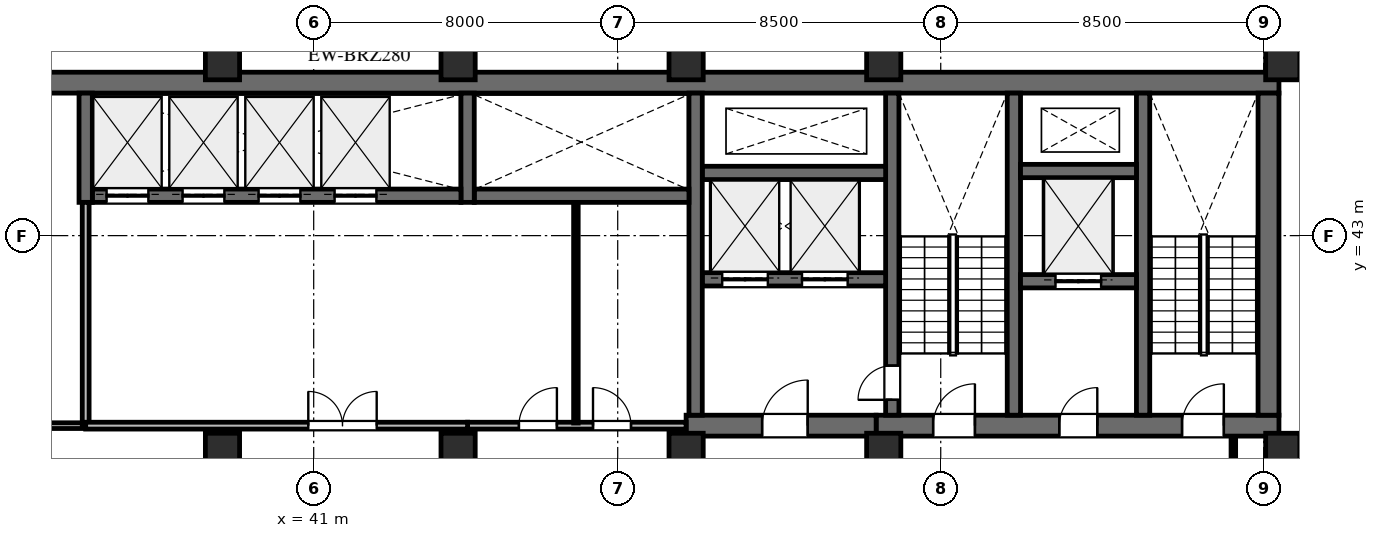
"""IFC4 building model, lengths in metres.
Left out: names, types, materials, properties, quantities, classifications, styles, units other than length and angle.
Written with IfcOpenShell. Run it as: python <this file> out.ifc"""

import sys

from ifc_helpers import new_model, si_unit, direction, frame, frame_2d, origin, origin_2d, place, context, subcontext, project, spatial, rectangle, extrude, element, fill, save


model = new_model("IFC4")
c1 = context("Model", 3, precision=1e-05, world=origin(), true_north=direction((0.0, 1.0)))
c2 = subcontext(c1, "Body", "Model", "MODEL_VIEW")
j1 = project(units=[si_unit("LENGTHUNIT", "METRE"), si_unit("PLANEANGLEUNIT", "RADIAN")], contexts=[c1])
p1 = place(None, origin())
s1 = spatial("IfcSite", under=j1, at=p1, CompositionType="ELEMENT")
p2 = place(p1, origin())
s2 = spatial("IfcBuilding", under=s1, at=p2, CompositionType="ELEMENT")
p3 = place(p2, frame((0.0, 0.0, 180.5)))
s3 = spatial("IfcBuildingStorey", under=s2, at=p3, CompositionType="ELEMENT", Elevation=180.5)
p4 = place(p3, frame((22.9, 47.025, 0.0), z_axis=(0.0, 0.0, 1.0), x_axis=(1.0, 0.0, 0.0)))
e1 = element("IfcWall", 1, at=p4, inside=s3, PredefinedType="SHEAR", context=c2, shape_type="SweptSolid", body=[
    extrude(rectangle(XDim=43.5, YDim=0.55, at=frame_2d((21.75, 0.0))), origin(), (0.0, 0.0, 1.0), 4.0),
])
p5 = place(p3, frame((55.8, 38.0, 0.0), z_axis=(0.0, 0.0, 1.0), x_axis=(1.0, 0.0, 0.0)))
e2 = element("IfcWall", 2, at=p5, inside=s3, PredefinedType="SHEAR", context=c2, shape_type="SweptSolid", body=[
    extrude(rectangle(XDim=10.6, YDim=0.55, at=frame_2d((5.3, 0.0))), origin(), (0.0, 0.0, 1.0), 4.0),
])
p6 = place(p5, frame((1.5, 0.0, 0.0)))
e3 = element("IfcOpeningElement", 3, at=p6, cuts=e2, PredefinedType="OPENING", context=c2, shape_type="SweptSolid", body=[
    extrude(rectangle(XDim=1.1, YDim=2.2, at=frame_2d((0.55, 1.1))), frame((0.0, 0.285, 0.0), z_axis=(0.0, -1.0, 0.0), x_axis=(1.0, 0.0, 0.0)), (0.0, 0.0, 1.0), 0.57),
])
p7 = place(p5, frame((4.82, 0.0, 0.0)))
e4 = element("IfcOpeningElement", 4, at=p7, cuts=e2, PredefinedType="OPENING", context=c2, shape_type="SweptSolid", body=[
    extrude(rectangle(XDim=1.0, YDim=2.15, at=frame_2d((0.5, 1.075))), frame((0.0, 0.285, 0.0), z_axis=(0.0, -1.0, 0.0), x_axis=(1.0, 0.0, 0.0)), (0.0, 0.0, 1.0), 0.57),
])
p8 = place(p5, frame((8.05, 0.0, 0.0)))
e5 = element("IfcOpeningElement", 5, at=p8, cuts=e2, PredefinedType="OPENING", context=c2, shape_type="SweptSolid", body=[
    extrude(rectangle(XDim=1.1, YDim=2.2, at=frame_2d((0.55, 1.1))), frame((0.0, 0.285, 0.0), z_axis=(0.0, -1.0, 0.0), x_axis=(1.0, 0.0, 0.0)), (0.0, 0.0, 1.0), 0.57),
])
p9 = place(p3, frame((66.125, 38.275, 0.0), z_axis=(0.0, 0.0, 1.0), x_axis=(0.0, 1.0, 0.0)))
e6 = element("IfcWall", 6, at=p9, inside=s3, PredefinedType="SHEAR", context=c2, shape_type="SweptSolid", body=[
    extrude(rectangle(XDim=8.475, YDim=0.55, at=frame_2d((4.238, 0.0))), origin(), (0.0, 0.0, 1.0), 4.0),
])
for number, where, z_axis, x_axis in (
    (7, (62.825, 38.275, 0.0), (0.0, 0.0, 1.0), (0.0, 1.0, 0.0)),
    (8, (59.425, 38.275, 0.0), (0.0, 0.0, 1.0), (0.0, 1.0, 0.0)),
):
    element("IfcWall", number, at=place(p3, frame(where, z_axis=z_axis, x_axis=x_axis)), inside=s3, PredefinedType="SHEAR", context=c2, shape_type="SweptSolid", body=[
        extrude(rectangle(XDim=8.475, YDim=0.35, at=frame_2d((4.238, 0.0))), origin(), (0.0, 0.0, 1.0), 4.0),
    ])
p10 = place(p3, frame((56.225, 38.275, 0.0), z_axis=(0.0, 0.0, 1.0), x_axis=(0.0, 1.0, 0.0)))
e9 = element("IfcWall", 9, at=p10, inside=s3, PredefinedType="SHEAR", context=c2, shape_type="SweptSolid", body=[
    extrude(rectangle(XDim=8.475, YDim=0.35, at=frame_2d((4.238, 0.0))), origin(), (0.0, 0.0, 1.0), 4.0),
])
p11 = place(p10, frame((0.405, 0.0, 0.0)))
e10 = element("IfcOpeningElement", 10, at=p11, cuts=e9, PredefinedType="OPENING", context=c2, shape_type="SweptSolid", body=[
    extrude(rectangle(XDim=0.9, YDim=2.15, at=frame_2d((0.45, 1.075))), frame((0.0, 0.185, 0.0), z_axis=(0.0, -1.0, 0.0), x_axis=(1.0, 0.0, 0.0)), (0.0, 0.0, 1.0), 0.37),
])
p12 = place(p3, frame((59.6, 41.8, 0.0), z_axis=(0.0, 0.0, 1.0), x_axis=(1.0, 0.0, 0.0)))
e11 = element("IfcWall", 11, at=p12, inside=s3, PredefinedType="SHEAR", context=c2, shape_type="SweptSolid", body=[
    extrude(rectangle(XDim=3.05, YDim=0.35, at=frame_2d((1.525, 0.0))), origin(), (0.0, 0.0, 1.0), 4.0),
])
p13 = place(p12, frame((0.92, 0.0, 0.0)))
e12 = element("IfcOpeningElement", 12, at=p13, cuts=e11, PredefinedType="OPENING", context=c2, shape_type="SweptSolid", body=[
    extrude(rectangle(XDim=1.2, YDim=2.2, at=frame_2d((0.6, 1.1))), frame((0.0, 0.185, 0.0), z_axis=(0.0, -1.0, 0.0), x_axis=(1.0, 0.0, 0.0)), (0.0, 0.0, 1.0), 0.37),
])
p14 = place(p3, frame((59.6, 44.7, 0.0), z_axis=(0.0, 0.0, 1.0), x_axis=(1.0, 0.0, 0.0)))
e13 = element("IfcWall", 13, at=p14, inside=s3, PredefinedType="SHEAR", context=c2, shape_type="SweptSolid", body=[
    extrude(rectangle(XDim=3.05, YDim=0.35, at=frame_2d((1.525, 0.0))), origin(), (0.0, 0.0, 1.0), 4.0),
])
p15 = place(p3, frame((50.8, 38.0, 0.0), z_axis=(0.0, 0.0, 1.0), x_axis=(1.0, 0.0, 0.0)))
e14 = element("IfcWall", 14, at=p15, inside=s3, PredefinedType="SHEAR", context=c2, shape_type="SweptSolid", body=[
    extrude(rectangle(XDim=5.0, YDim=0.55, at=frame_2d((2.5, 0.0))), origin(), (0.0, 0.0, 1.0), 4.0),
])
p16 = place(p15, frame((2.0, 0.0, 0.0)))
e15 = element("IfcOpeningElement", 15, at=p16, cuts=e14, PredefinedType="OPENING", context=c2, shape_type="SweptSolid", body=[
    extrude(rectangle(XDim=1.2, YDim=2.2, at=frame_2d((0.6, 1.1))), frame((0.0, 0.285, 0.0), z_axis=(0.0, -1.0, 0.0), x_axis=(1.0, 0.0, 0.0)), (0.0, 0.0, 1.0), 0.57),
])
p17 = place(p3, frame((51.225, 41.85, 0.0), z_axis=(0.0, 0.0, 1.0), x_axis=(1.0, 0.0, 0.0)))
e16 = element("IfcWall", 16, at=p17, inside=s3, PredefinedType="SHEAR", context=c2, shape_type="SweptSolid", body=[
    extrude(rectangle(XDim=4.825, YDim=0.35, at=frame_2d((2.413, 0.0))), origin(), (0.0, 0.0, 1.0), 4.0),
])
p18 = place(p17, frame((0.525, 0.0, 0.0)))
e17 = element("IfcOpeningElement", 17, at=p18, cuts=e16, PredefinedType="OPENING", context=c2, shape_type="SweptSolid", body=[
    extrude(rectangle(XDim=1.2, YDim=2.2, at=frame_2d((0.6, 1.1))), frame((0.0, 0.185, 0.0), z_axis=(0.0, -1.0, 0.0), x_axis=(1.0, 0.0, 0.0)), (0.0, 0.0, 1.0), 0.37),
])
p19 = place(p17, frame((2.625, 0.0, 0.0)))
e18 = element("IfcOpeningElement", 18, at=p19, cuts=e16, PredefinedType="OPENING", context=c2, shape_type="SweptSolid", body=[
    extrude(rectangle(XDim=1.2, YDim=2.2, at=frame_2d((0.6, 1.1))), frame((0.0, 0.185, 0.0), z_axis=(0.0, -1.0, 0.0), x_axis=(1.0, 0.0, 0.0)), (0.0, 0.0, 1.0), 0.37),
])
p20 = place(p3, frame((51.225, 44.65, 0.0), z_axis=(0.0, 0.0, 1.0), x_axis=(1.0, 0.0, 0.0)))
e19 = element("IfcWall", 19, at=p20, inside=s3, PredefinedType="SHEAR", context=c2, shape_type="SweptSolid", body=[
    extrude(rectangle(XDim=4.825, YDim=0.35, at=frame_2d((2.413, 0.0))), origin(), (0.0, 0.0, 1.0), 4.0),
])
p21 = place(p3, frame((51.05, 38.275, 0.0), z_axis=(0.0, 0.0, 1.0), x_axis=(0.0, 1.0, 0.0)))
e20 = element("IfcWall", 20, at=p21, inside=s3, PredefinedType="SHEAR", context=c2, shape_type="SweptSolid", body=[
    extrude(rectangle(XDim=8.475, YDim=0.35, at=frame_2d((4.238, 0.0))), origin(), (0.0, 0.0, 1.0), 4.0),
])
p22 = place(p3, frame((45.225, 44.05, 0.0), z_axis=(0.0, 0.0, 1.0), x_axis=(1.0, 0.0, 0.0)))
e21 = element("IfcWall", 21, at=p22, inside=s3, PredefinedType="SHEAR", context=c2, shape_type="SweptSolid", body=[
    extrude(rectangle(XDim=5.65, YDim=0.35, at=frame_2d((2.825, 0.0))), origin(), (0.0, 0.0, 1.0), 4.0),
])
p23 = place(p3, frame((45.05, 43.875, 0.0), z_axis=(0.0, 0.0, 1.0), x_axis=(0.0, 1.0, 0.0)))
e22 = element("IfcWall", 22, at=p23, inside=s3, PredefinedType="SHEAR", context=c2, shape_type="SweptSolid", body=[
    extrude(rectangle(XDim=2.875, YDim=0.35, at=frame_2d((1.438, 0.0))), origin(), (0.0, 0.0, 1.0), 4.0),
])
p24 = place(p3, frame((35.175, 44.05, 0.0), z_axis=(0.0, 0.0, 1.0), x_axis=(1.0, 0.0, 0.0)))
e23 = element("IfcWall", 23, at=p24, inside=s3, PredefinedType="SHEAR", context=c2, shape_type="SweptSolid", body=[
    extrude(rectangle(XDim=9.7, YDim=0.35, at=frame_2d((4.85, 0.0))), origin(), (0.0, 0.0, 1.0), 4.0),
])
p25 = place(p24, frame((0.375, 0.0, 0.0)))
e24 = element("IfcOpeningElement", 24, at=p25, cuts=e23, PredefinedType="OPENING", context=c2, shape_type="SweptSolid", body=[
    extrude(rectangle(XDim=1.1, YDim=2.2, at=frame_2d((0.55, 1.1))), frame((0.0, 0.185, 0.0), z_axis=(0.0, -1.0, 0.0), x_axis=(1.0, 0.0, 0.0)), (0.0, 0.0, 1.0), 0.37),
])
p26 = place(p24, frame((2.375, 0.0, 0.0)))
e25 = element("IfcOpeningElement", 25, at=p26, cuts=e23, PredefinedType="OPENING", context=c2, shape_type="SweptSolid", body=[
    extrude(rectangle(XDim=1.1, YDim=2.2, at=frame_2d((0.55, 1.1))), frame((0.0, 0.185, 0.0), z_axis=(0.0, -1.0, 0.0), x_axis=(1.0, 0.0, 0.0)), (0.0, 0.0, 1.0), 0.37),
])
p27 = place(p24, frame((4.375, 0.0, 0.0)))
e26 = element("IfcOpeningElement", 26, at=p27, cuts=e23, PredefinedType="OPENING", context=c2, shape_type="SweptSolid", body=[
    extrude(rectangle(XDim=1.1, YDim=2.2, at=frame_2d((0.55, 1.1))), frame((0.0, 0.185, 0.0), z_axis=(0.0, -1.0, 0.0), x_axis=(1.0, 0.0, 0.0)), (0.0, 0.0, 1.0), 0.37),
])
p28 = place(p24, frame((6.375, 0.0, 0.0)))
e27 = element("IfcOpeningElement", 27, at=p28, cuts=e23, PredefinedType="OPENING", context=c2, shape_type="SweptSolid", body=[
    extrude(rectangle(XDim=1.1, YDim=2.2, at=frame_2d((0.55, 1.1))), frame((0.0, 0.185, 0.0), z_axis=(0.0, -1.0, 0.0), x_axis=(1.0, 0.0, 0.0)), (0.0, 0.0, 1.0), 0.37),
])
p29 = place(p3, frame((35.0, 43.875, 0.0), z_axis=(0.0, 0.0, 1.0), x_axis=(0.0, 1.0, 0.0)))
e28 = element("IfcWall", 28, at=p29, inside=s3, PredefinedType="SHEAR", context=c2, shape_type="SweptSolid", body=[
    extrude(rectangle(XDim=2.875, YDim=0.35, at=frame_2d((1.438, 0.0))), origin(), (0.0, 0.0, 1.0), 4.0),
])
for number, where, z_axis, x_axis in (
    (29, (66.5, 47.55, 0.0), (0.0, 0.0, 1.0), (1.0, 0.0, 0.0)),
    (30, (56.0, 47.55, 0.0), (0.0, 0.0, 1.0), (1.0, 0.0, 0.0)),
    (31, (66.5, 37.35, 0.0), (0.0, 0.0, 1.0), (1.0, 0.0, 0.0)),
    (32, (56.0, 37.35, 0.0), (0.0, 0.0, 1.0), (1.0, 0.0, 0.0)),
    (33, (50.8, 47.55, 0.0), (0.0, 0.0, 1.0), (1.0, 0.0, 0.0)),
    (34, (50.8, 37.35, 0.0), (0.0, 0.0, 1.0), (1.0, 0.0, 0.0)),
    (35, (44.8, 37.35, 0.0), (0.0, 0.0, 1.0), (1.0, 0.0, 0.0)),
    (36, (44.8, 47.55, 0.0), (0.0, 0.0, 1.0), (1.0, 0.0, 0.0)),
    (37, (38.6, 37.35, 0.0), (0.0, 0.0, 1.0), (1.0, 0.0, 0.0)),
    (38, (38.6, 47.55, 0.0), (0.0, 0.0, 1.0), (1.0, 0.0, 0.0)),
):
    element("IfcColumn", number, at=place(p3, frame(where, z_axis=z_axis, x_axis=x_axis)), inside=s3, PredefinedType="COLUMN", context=c2, shape_type="SweptSolid", body=[
        extrude(rectangle(XDim=0.9, YDim=0.9, at=origin_2d()), origin(), (0.0, 0.0, 1.0), 4.0),
    ])
p30 = place(p3, frame((68.375, 37.8, 0.0), z_axis=(0.0, 0.0, 1.0), x_axis=(-0.139173290738, -0.99026804207, 0.0)))
e39 = element("IfcWall", 39, at=p30, inside=s3, PredefinedType="STANDARD", context=c2, shape_type="SweptSolid", body=[
    extrude(rectangle(XDim=24.498, YDim=0.28, at=frame_2d((12.249, 0.0))), origin(), (0.0, 0.0, 1.0), 3.755),
])
p31 = place(p30, frame((8.319, 0.0, 0.0)))
e40 = element("IfcOpeningElement", 40, at=p31, cuts=e39, PredefinedType="OPENING", context=c2, shape_type="SweptSolid", body=[
    extrude(rectangle(XDim=1.0, YDim=2.15, at=frame_2d((0.5, 1.075))), frame((0.0, 0.15, 0.0), z_axis=(0.0, -1.0, 0.0), x_axis=(1.0, 0.0, 0.0)), (0.0, 0.0, 1.0), 0.3),
])
p32 = place(p30, frame((3.869, 0.0, 0.65)))
e41 = element("IfcOpeningElement", 41, at=p32, cuts=e39, PredefinedType="OPENING", context=c2, shape_type="SweptSolid", body=[
    extrude(rectangle(XDim=1.8, YDim=2.1, at=frame_2d((0.9, 1.05))), frame((0.0, 0.15, 0.0), z_axis=(0.0, -1.0, 0.0), x_axis=(1.0, 0.0, 0.0)), (0.0, 0.0, 1.0), 0.3),
])
p33 = place(p30, frame((15.692, 0.0, 0.65)))
e42 = element("IfcOpeningElement", 42, at=p33, cuts=e39, PredefinedType="OPENING", context=c2, shape_type="SweptSolid", body=[
    extrude(rectangle(XDim=1.8, YDim=2.1, at=frame_2d((0.9, 1.05))), frame((0.0, 0.15, 0.0), z_axis=(0.0, -1.0, 0.0), x_axis=(1.0, 0.0, 0.0)), (0.0, 0.0, 1.0), 0.3),
])
p34 = place(p3, frame((45.05, 38.0, 0.0), z_axis=(0.0, 0.0, 1.0), x_axis=(1.0, 0.0, 0.0)))
e43 = element("IfcWall", 43, at=p34, inside=s3, PredefinedType="STANDARD", context=c2, shape_type="SweptSolid", body=[
    extrude(rectangle(XDim=5.75, YDim=0.18, at=frame_2d((2.875, 0.0))), origin(), (0.0, 0.0, 1.0), 2.982),
])
p35 = place(p34, frame((1.35, 0.0, 0.0)))
e44 = element("IfcOpeningElement", 44, at=p35, cuts=e43, PredefinedType="OPENING", context=c2, shape_type="SweptSolid", body=[
    extrude(rectangle(XDim=1.0, YDim=2.15, at=frame_2d((0.5, 1.075))), frame((0.0, 0.1, 0.0), z_axis=(0.0, -1.0, 0.0), x_axis=(1.0, 0.0, 0.0)), (0.0, 0.0, 1.0), 0.2),
])
p36 = place(p34, frame((3.3, 0.0, 0.0)))
e45 = element("IfcOpeningElement", 45, at=p36, cuts=e43, PredefinedType="OPENING", context=c2, shape_type="SweptSolid", body=[
    extrude(rectangle(XDim=1.0, YDim=2.15, at=frame_2d((0.5, 1.075))), frame((0.0, 0.1, 0.0), z_axis=(0.0, -1.0, 0.0), x_axis=(1.0, 0.0, 0.0)), (0.0, 0.0, 1.0), 0.2),
])
p37 = place(p3, frame((47.9, 38.068, 0.0), z_axis=(0.0, 0.0, 1.0), x_axis=(0.0, 1.0, 0.0)))
e46 = element("IfcWall", 46, at=p37, inside=s3, PredefinedType="PARTITIONING", context=c2, shape_type="SweptSolid", body=[
    extrude(rectangle(XDim=5.799, YDim=0.12, at=frame_2d((2.899, 0.0))), origin(), (0.0, 0.0, 1.0), 3.755),
])
p38 = place(p3, frame((27.05, 38.0, 0.0), z_axis=(0.0, 0.0, 1.0), x_axis=(1.0, 0.0, 0.0)))
e47 = element("IfcWall", 47, at=p38, inside=s3, PredefinedType="PARTITIONING", context=c2, shape_type="SweptSolid", body=[
    extrude(rectangle(XDim=7.95, YDim=0.15, at=frame_2d((3.975, 0.0))), origin(), (0.0, 0.0, 1.0), 2.982),
])
p39 = place(p38, frame((2.25, 0.0, 0.0)))
e48 = element("IfcOpeningElement", 48, at=p39, cuts=e47, PredefinedType="OPENING", context=c2, shape_type="SweptSolid", body=[
    extrude(rectangle(XDim=1.5, YDim=2.2, at=frame_2d((0.75, 1.1))), frame((0.0, 0.085, 0.0), z_axis=(0.0, -1.0, 0.0), x_axis=(1.0, 0.0, 0.0)), (0.0, 0.0, 1.0), 0.17),
])
p40 = place(p3, frame((35.0, 38.0, 0.0), z_axis=(0.0, 0.0, 1.0), x_axis=(0.0, 1.0, 0.0)))
e49 = element("IfcWall", 49, at=p40, inside=s3, PredefinedType="STANDARD", context=c2, shape_type="SweptSolid", body=[
    extrude(rectangle(XDim=5.875, YDim=0.18, at=frame_2d((2.938, 0.0))), origin(), (0.0, 0.0, 1.0), 3.755),
])
p41 = place(p3, frame((35.0, 38.0, 0.0), z_axis=(0.0, 0.0, 1.0), x_axis=(1.0, 0.0, 0.0)))
e50 = element("IfcWall", 50, at=p41, inside=s3, PredefinedType="STANDARD", context=c2, shape_type="SweptSolid", body=[
    extrude(rectangle(XDim=10.05, YDim=0.18, at=frame_2d((5.025, 0.0))), origin(), (0.0, 0.0, 1.0), 2.982),
])
p42 = place(p41, frame((5.858, 0.0, 0.0)))
e51 = element("IfcOpeningElement", 51, at=p42, cuts=e50, PredefinedType="OPENING", context=c2, shape_type="SweptSolid", body=[
    extrude(rectangle(XDim=1.8, YDim=2.2, at=frame_2d((0.9, 1.1))), frame((0.0, 0.1, 0.0), z_axis=(0.0, -1.0, 0.0), x_axis=(1.0, 0.0, 0.0)), (0.0, 0.0, 1.0), 0.2),
])
p43 = place(p3, frame((65.2, 34.4, 0.0), z_axis=(0.0, 0.0, 1.0), x_axis=(0.0, 1.0, 0.0)))
e52 = element("IfcWall", 52, at=p43, inside=s3, PredefinedType="PARTITIONING", context=c2, shape_type="SweptSolid", body=[
    extrude(rectangle(XDim=3.317, YDim=0.12, at=frame_2d((1.659, 0.0))), origin(), (0.0, 0.0, 1.0), 2.982),
])
p44 = place(p6, origin())
e53 = element("IfcDoor", 53, at=p44, inside=s3, OperationType="SINGLE_SWING_RIGHT", PredefinedType="DOOR", context=c2, shape_type="SweptSolid", body=[
    extrude(rectangle(XDim=1.1, YDim=2.2, at=frame_2d((0.55, 1.1))), frame((0.0, 0.025, 0.0), z_axis=(0.0, -1.0, 0.0), x_axis=(1.0, 0.0, 0.0)), (0.0, 0.0, 1.0), 0.05),
])
fill(e3, e53)
p45 = place(p7, origin())
e54 = element("IfcDoor", 54, at=p45, inside=s3, OperationType="SINGLE_SWING_RIGHT", PredefinedType="DOOR", context=c2, shape_type="SweptSolid", body=[
    extrude(rectangle(XDim=1.0, YDim=2.15, at=frame_2d((0.5, 1.075))), frame((0.0, 0.025, 0.0), z_axis=(0.0, -1.0, 0.0), x_axis=(1.0, 0.0, 0.0)), (0.0, 0.0, 1.0), 0.05),
])
fill(e4, e54)
p46 = place(p8, origin())
e55 = element("IfcDoor", 55, at=p46, inside=s3, OperationType="SINGLE_SWING_RIGHT", PredefinedType="DOOR", context=c2, shape_type="SweptSolid", body=[
    extrude(rectangle(XDim=1.1, YDim=2.2, at=frame_2d((0.55, 1.1))), frame((0.0, 0.025, 0.0), z_axis=(0.0, -1.0, 0.0), x_axis=(1.0, 0.0, 0.0)), (0.0, 0.0, 1.0), 0.05),
])
fill(e5, e55)
p47 = place(p16, origin())
e56 = element("IfcDoor", 56, at=p47, inside=s3, OperationType="SINGLE_SWING_RIGHT", PredefinedType="DOOR", context=c2, shape_type="SweptSolid", body=[
    extrude(rectangle(XDim=1.2, YDim=2.2, at=frame_2d((0.6, 1.1))), frame((0.0, 0.025, 0.0), z_axis=(0.0, -1.0, 0.0), x_axis=(1.0, 0.0, 0.0)), (0.0, 0.0, 1.0), 0.05),
])
fill(e15, e56)
p48 = place(p11, origin())
e57 = element("IfcDoor", 57, at=p48, inside=s3, OperationType="SINGLE_SWING_LEFT", PredefinedType="DOOR", context=c2, shape_type="SweptSolid", body=[
    extrude(rectangle(XDim=0.9, YDim=2.15, at=frame_2d((0.45, 1.075))), frame((0.0, 0.025, 0.0), z_axis=(0.0, -1.0, 0.0), x_axis=(1.0, 0.0, 0.0)), (0.0, 0.0, 1.0), 0.05),
])
fill(e10, e57)
p49 = place(p25, origin())
e58 = element("IfcDoor", 58, at=p49, inside=s3, OperationType="DOUBLE_DOOR_SLIDING", PredefinedType="DOOR", context=c2, shape_type="SweptSolid", body=[
    extrude(rectangle(XDim=1.1, YDim=2.2, at=frame_2d((0.55, 1.1))), frame((0.0, 0.025, 0.0), z_axis=(0.0, -1.0, 0.0), x_axis=(1.0, 0.0, 0.0)), (0.0, 0.0, 1.0), 0.05),
])
fill(e24, e58)
p50 = place(p26, origin())
e59 = element("IfcDoor", 59, at=p50, inside=s3, OperationType="DOUBLE_DOOR_SLIDING", PredefinedType="DOOR", context=c2, shape_type="SweptSolid", body=[
    extrude(rectangle(XDim=1.1, YDim=2.2, at=frame_2d((0.55, 1.1))), frame((0.0, 0.025, 0.0), z_axis=(0.0, -1.0, 0.0), x_axis=(1.0, 0.0, 0.0)), (0.0, 0.0, 1.0), 0.05),
])
fill(e25, e59)
p51 = place(p27, origin())
e60 = element("IfcDoor", 60, at=p51, inside=s3, OperationType="DOUBLE_DOOR_SLIDING", PredefinedType="DOOR", context=c2, shape_type="SweptSolid", body=[
    extrude(rectangle(XDim=1.1, YDim=2.2, at=frame_2d((0.55, 1.1))), frame((0.0, 0.025, 0.0), z_axis=(0.0, -1.0, 0.0), x_axis=(1.0, 0.0, 0.0)), (0.0, 0.0, 1.0), 0.05),
])
fill(e26, e60)
p52 = place(p28, origin())
e61 = element("IfcDoor", 61, at=p52, inside=s3, OperationType="DOUBLE_DOOR_SLIDING", PredefinedType="DOOR", context=c2, shape_type="SweptSolid", body=[
    extrude(rectangle(XDim=1.1, YDim=2.2, at=frame_2d((0.55, 1.1))), frame((0.0, 0.025, 0.0), z_axis=(0.0, -1.0, 0.0), x_axis=(1.0, 0.0, 0.0)), (0.0, 0.0, 1.0), 0.05),
])
fill(e27, e61)
p53 = place(p18, origin())
e62 = element("IfcDoor", 62, at=p53, inside=s3, OperationType="DOUBLE_DOOR_SLIDING", PredefinedType="DOOR", context=c2, shape_type="SweptSolid", body=[
    extrude(rectangle(XDim=1.2, YDim=2.2, at=frame_2d((0.6, 1.1))), frame((0.0, 0.025, 0.0), z_axis=(0.0, -1.0, 0.0), x_axis=(1.0, 0.0, 0.0)), (0.0, 0.0, 1.0), 0.05),
])
fill(e17, e62)
p54 = place(p19, origin())
e63 = element("IfcDoor", 63, at=p54, inside=s3, OperationType="DOUBLE_DOOR_SLIDING", PredefinedType="DOOR", context=c2, shape_type="SweptSolid", body=[
    extrude(rectangle(XDim=1.2, YDim=2.2, at=frame_2d((0.6, 1.1))), frame((0.0, 0.025, 0.0), z_axis=(0.0, -1.0, 0.0), x_axis=(1.0, 0.0, 0.0)), (0.0, 0.0, 1.0), 0.05),
])
fill(e18, e63)
p55 = place(p13, origin())
e64 = element("IfcDoor", 64, at=p55, inside=s3, OperationType="DOUBLE_DOOR_SLIDING", PredefinedType="DOOR", context=c2, shape_type="SweptSolid", body=[
    extrude(rectangle(XDim=1.2, YDim=2.2, at=frame_2d((0.6, 1.1))), frame((0.0, 0.025, 0.0), z_axis=(0.0, -1.0, 0.0), x_axis=(1.0, 0.0, 0.0)), (0.0, 0.0, 1.0), 0.05),
])
fill(e12, e64)
p56 = place(p35, origin())
e65 = element("IfcDoor", 65, at=p56, inside=s3, OperationType="SINGLE_SWING_RIGHT", PredefinedType="DOOR", context=c2, shape_type="SweptSolid", body=[
    extrude(rectangle(XDim=1.0, YDim=2.15, at=frame_2d((0.5, 1.075))), frame((0.0, 0.025, 0.0), z_axis=(0.0, -1.0, 0.0), x_axis=(1.0, 0.0, 0.0)), (0.0, 0.0, 1.0), 0.05),
])
fill(e44, e65)
p57 = place(p36, origin())
e66 = element("IfcDoor", 66, at=p57, inside=s3, OperationType="SINGLE_SWING_LEFT", PredefinedType="DOOR", context=c2, shape_type="SweptSolid", body=[
    extrude(rectangle(XDim=1.0, YDim=2.15, at=frame_2d((0.5, 1.075))), frame((0.0, 0.025, 0.0), z_axis=(0.0, -1.0, 0.0), x_axis=(1.0, 0.0, 0.0)), (0.0, 0.0, 1.0), 0.05),
])
fill(e45, e66)
p58 = place(p42, origin())
e67 = element("IfcDoor", 67, at=p58, inside=s3, OperationType="DOUBLE_DOOR_SINGLE_SWING", PredefinedType="DOOR", context=c2, shape_type="SweptSolid", body=[
    extrude(rectangle(XDim=1.8, YDim=2.2, at=frame_2d((0.9, 1.1))), frame((0.0, 0.025, 0.0), z_axis=(0.0, -1.0, 0.0), x_axis=(1.0, 0.0, 0.0)), (0.0, 0.0, 1.0), 0.05),
])
fill(e51, e67)
save(model, sys.argv[1])
